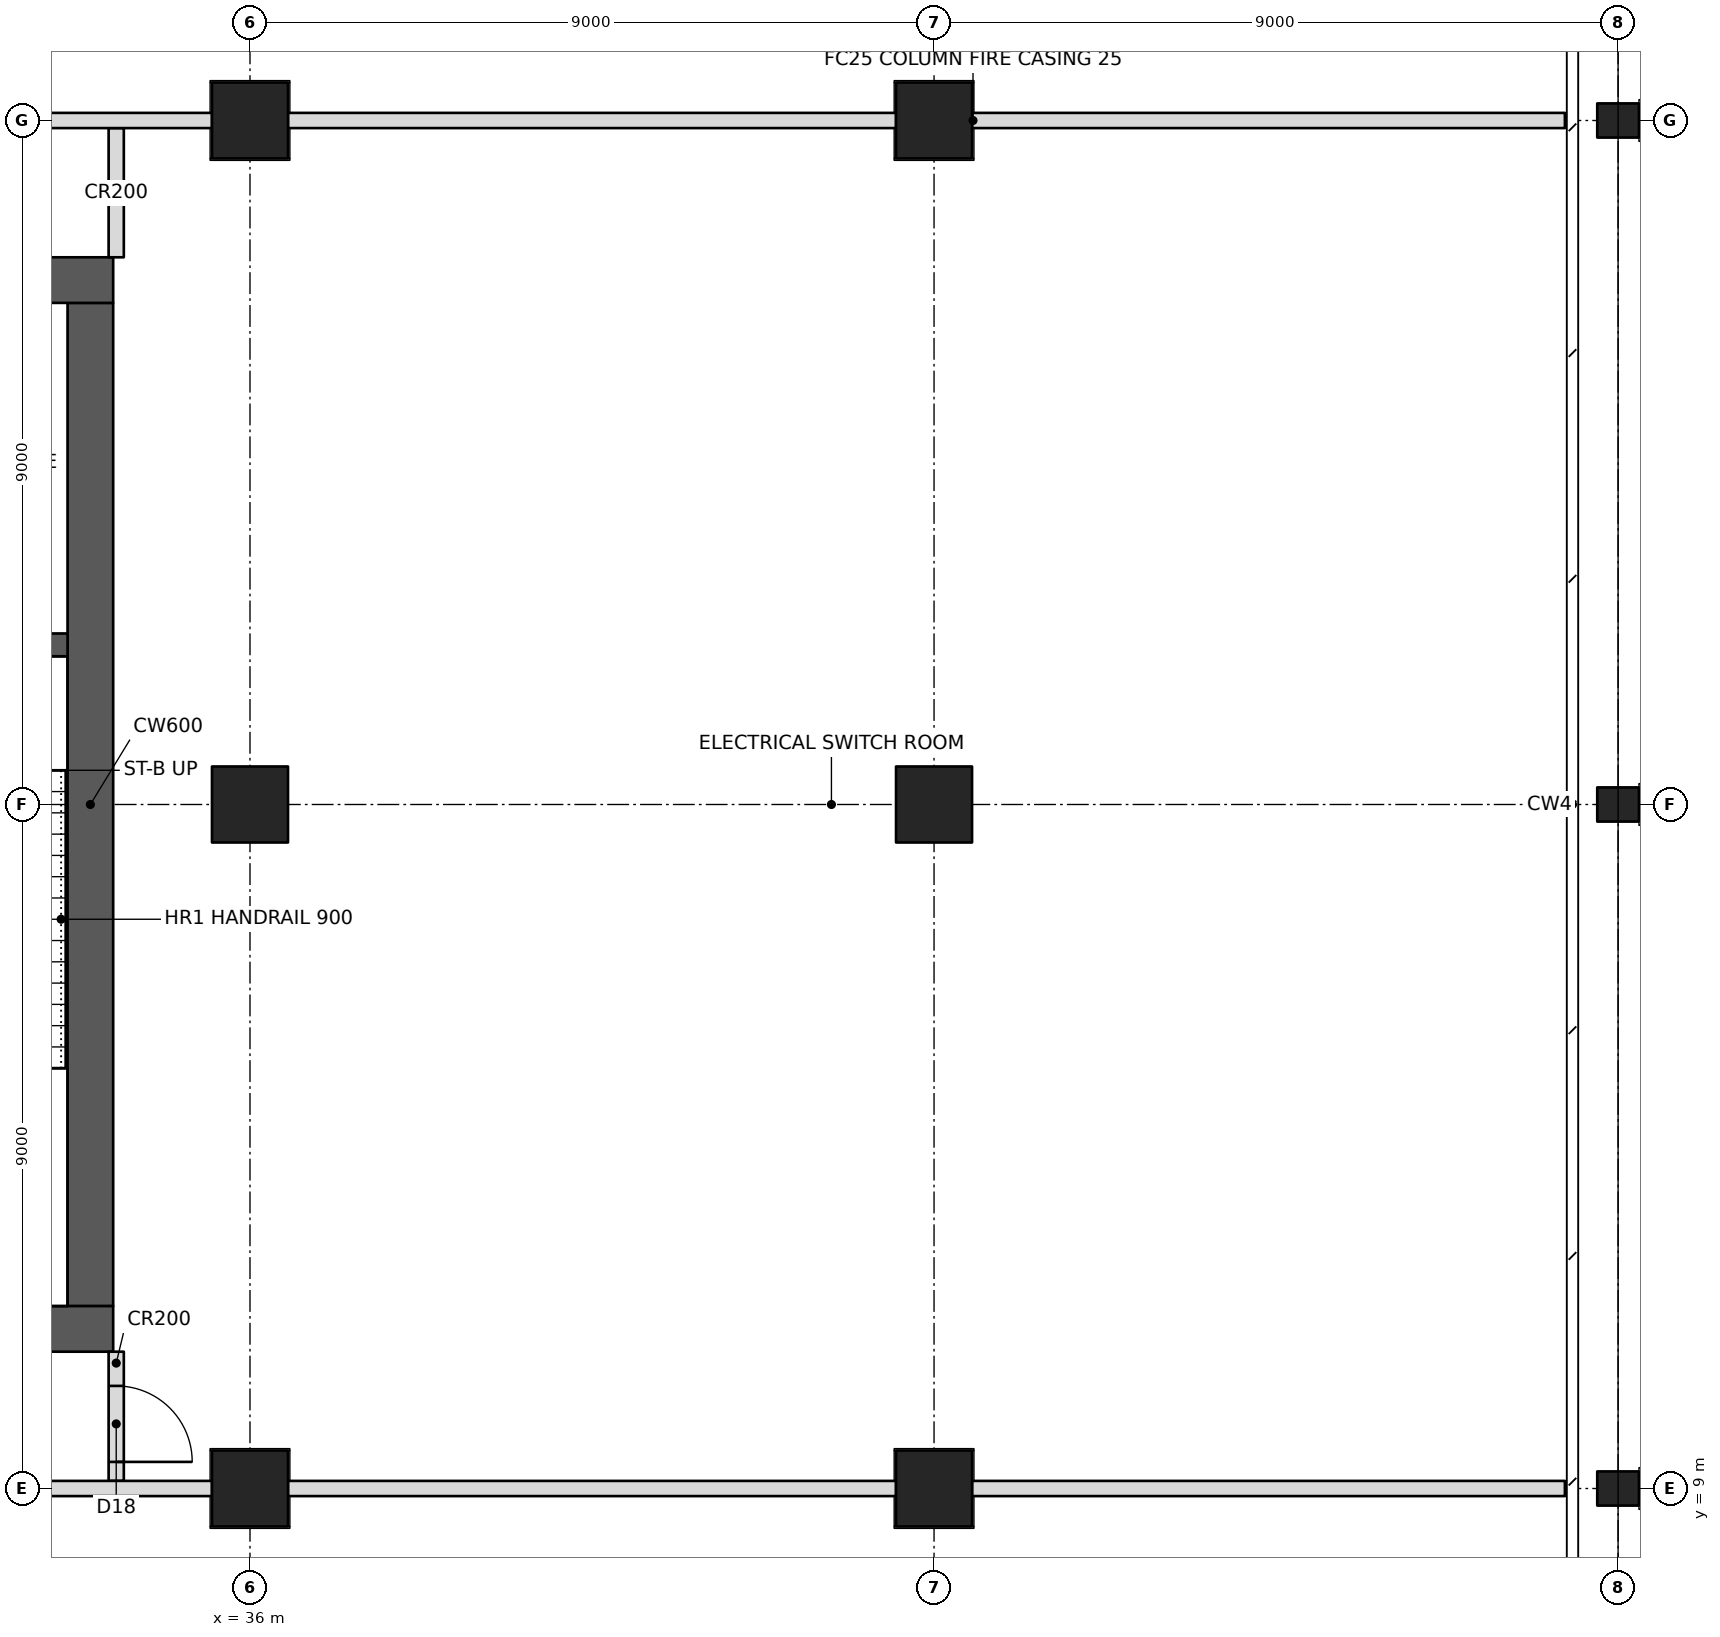
"""IFC4 building model, lengths in metres.
Left out: names, types, materials, properties, quantities, classifications, styles, units other than length and angle.
Written with IfcOpenShell. Run it as: python <this file> out.ifc"""

import sys

from ifc_helpers import new_model, si_unit, direction, frame, frame_2d, origin, origin_2d, place, context, subcontext, project, spatial, rectangle, hollow_rectangle, i_section, extrude, element, fill, save


model = new_model("IFC4")
c1 = context("Model", 3, precision=1e-05, world=origin(), true_north=direction((0.0, 1.0)))
c2 = subcontext(c1, "Body", "Model", "MODEL_VIEW")
j1 = project(units=[si_unit("LENGTHUNIT", "METRE"), si_unit("PLANEANGLEUNIT", "RADIAN")], contexts=[c1])
p1 = place(None, origin())
s1 = spatial("IfcSite", under=j1, at=p1, CompositionType="ELEMENT")
p2 = place(p1, origin())
s2 = spatial("IfcBuilding", under=s1, at=p2, CompositionType="ELEMENT")
p3 = place(p2, frame((0.0, 0.0, 89.2)))
s3 = spatial("IfcBuildingStorey", under=s2, at=p3, CompositionType="ELEMENT", Elevation=89.2)
for number, where, z_axis, x_axis in (
    (1, (36.0, 9.0, 0.0), (0.0, 0.0, 1.0), (0.0, 1.0, 0.0)),
    (2, (36.0, 18.0, 0.0), (0.0, 0.0, 1.0), (0.0, 1.0, 0.0)),
    (3, (36.0, 27.0, 0.0), (0.0, 0.0, 1.0), (1.0, 0.0, 0.0)),
    (4, (45.0, 9.0, 0.0), (0.0, 0.0, 1.0), (0.0, 1.0, 0.0)),
    (5, (45.0, 18.0, 0.0), (0.0, 0.0, 1.0), (0.0, 1.0, 0.0)),
    (6, (45.0, 27.0, 0.0), (0.0, 0.0, 1.0), (0.0, 1.0, 0.0)),
):
    element("IfcColumn", number, at=place(p3, frame(where, z_axis=z_axis, x_axis=x_axis)), inside=s3, PredefinedType="COLUMN", context=c2, shape_type="SweptSolid", body=[
        extrude(hollow_rectangle(XDim=1.0, YDim=1.0, WallThickness=0.1, at=origin_2d()), origin(), (0.0, 0.0, 1.0), 5.0),
    ])
for number, where, z_axis, x_axis in (
    (7, (54.0, 9.0, 0.0), (0.0, 0.0, 1.0), (0.0, 1.0, 0.0)),
    (8, (54.0, 18.0, 0.0), (0.0, 0.0, 1.0), (0.0, 1.0, 0.0)),
    (9, (54.0, 27.0, 0.0), (0.0, 0.0, 1.0), (0.0, 1.0, 0.0)),
):
    element("IfcColumn", number, at=place(p3, frame(where, z_axis=z_axis, x_axis=x_axis)), inside=s3, PredefinedType="COLUMN", context=c2, shape_type="SweptSolid", body=[
        extrude(i_section(OverallWidth=0.449, OverallDepth=0.549, WebThickness=0.072, FlangeThickness=0.115, at=origin_2d()), origin(), (0.0, 0.0, 1.0), 5.0),
    ])
p4 = place(p3, frame((10.8, 11.1, 0.0), z_axis=(0.0, 0.0, 1.0), x_axis=(1.0, 0.0, 0.0)))
e10 = element("IfcWall", 10, at=p4, inside=s3, PredefinedType="SHEAR", context=c2, shape_type="SweptSolid", body=[
    extrude(rectangle(XDim=23.4, YDim=0.6, at=frame_2d((11.7, 0.0))), origin(), (0.0, 0.0, 1.0), 5.0),
])
p5 = place(p4, frame((1.0, 0.0, 0.0)))
e11 = element("IfcOpeningElement", 11, at=p5, cuts=e10, PredefinedType="OPENING", context=c2, shape_type="SweptSolid", body=[
    extrude(rectangle(XDim=1.0, YDim=2.1, at=frame_2d((0.5, 1.05))), frame((0.0, 0.31, 0.0), z_axis=(0.0, -1.0, 0.0), x_axis=(1.0, 0.0, 0.0)), (0.0, 0.0, 1.0), 0.62),
])
p6 = place(p4, frame((17.2, 0.0, 0.0)))
e12 = element("IfcOpeningElement", 12, at=p6, cuts=e10, PredefinedType="OPENING", context=c2, shape_type="SweptSolid", body=[
    extrude(rectangle(XDim=1.8, YDim=2.1, at=frame_2d((0.9, 1.05))), frame((0.0, 0.31, 0.0), z_axis=(0.0, -1.0, 0.0), x_axis=(1.0, 0.0, 0.0)), (0.0, 0.0, 1.0), 0.62),
])
p7 = place(p3, frame((10.8, 24.9, 0.0), z_axis=(0.0, 0.0, 1.0), x_axis=(1.0, 0.0, 0.0)))
e13 = element("IfcWall", 13, at=p7, inside=s3, PredefinedType="SHEAR", context=c2, shape_type="SweptSolid", body=[
    extrude(rectangle(XDim=23.4, YDim=0.6, at=frame_2d((11.7, 0.0))), origin(), (0.0, 0.0, 1.0), 5.0),
])
p8 = place(p7, frame((17.2, 0.0, 0.0)))
e14 = element("IfcOpeningElement", 14, at=p8, cuts=e13, PredefinedType="OPENING", context=c2, shape_type="SweptSolid", body=[
    extrude(rectangle(XDim=1.8, YDim=2.1, at=frame_2d((0.9, 1.05))), frame((0.0, 0.31, 0.0), z_axis=(0.0, -1.0, 0.0), x_axis=(1.0, 0.0, 0.0)), (0.0, 0.0, 1.0), 0.62),
])
p9 = place(p7, frame((21.1, 0.0, 0.0)))
e15 = element("IfcOpeningElement", 15, at=p9, cuts=e13, PredefinedType="OPENING", context=c2, shape_type="SweptSolid", body=[
    extrude(rectangle(XDim=1.0, YDim=2.1, at=frame_2d((0.5, 1.05))), frame((0.0, 0.31, 0.0), z_axis=(0.0, -1.0, 0.0), x_axis=(1.0, 0.0, 0.0)), (0.0, 0.0, 1.0), 0.62),
])
p10 = place(p3, frame((33.9, 11.4, 0.0), z_axis=(0.0, 0.0, 1.0), x_axis=(0.0, 1.0, 0.0)))
e16 = element("IfcWall", 16, at=p10, inside=s3, PredefinedType="SHEAR", context=c2, shape_type="SweptSolid", body=[
    extrude(rectangle(XDim=13.2, YDim=0.6, at=frame_2d((6.6, 0.0))), origin(), (0.0, 0.0, 1.0), 5.0),
])
p11 = place(p3, frame((30.75, 20.1, 0.0), z_axis=(0.0, 0.0, 1.0), x_axis=(1.0, 0.0, 0.0)))
e17 = element("IfcWall", 17, at=p11, inside=s3, PredefinedType="SHEAR", context=c2, shape_type="SweptSolid", body=[
    extrude(rectangle(XDim=2.85, YDim=0.3, at=frame_2d((1.425, 0.0))), origin(), (0.0, 0.0, 1.0), 5.0),
])
p12 = place(p11, frame((1.15, 0.0, 0.0)))
e18 = element("IfcOpeningElement", 18, at=p12, cuts=e17, PredefinedType="OPENING", context=c2, shape_type="SweptSolid", body=[
    extrude(rectangle(XDim=1.0, YDim=2.1, at=frame_2d((0.5, 1.05))), frame((0.0, 0.16, 0.0), z_axis=(0.0, -1.0, 0.0), x_axis=(1.0, 0.0, 0.0)), (0.0, 0.0, 1.0), 0.32),
])
p13 = place(p3, frame((27.5, 9.0, 0.0), z_axis=(0.0, 0.0, 1.0), x_axis=(1.0, 0.0, 0.0)))
e19 = element("IfcWall", 19, at=p13, inside=s3, PredefinedType="PARTITIONING", context=c2, shape_type="SweptSolid", body=[
    extrude(rectangle(XDim=8.0, YDim=0.2, at=frame_2d((4.0, 0.0))), origin(), (0.0, 0.0, 1.0), 4.005),
])
p14 = place(p3, frame((36.5, 9.0, 0.0), z_axis=(0.0, 0.0, 1.0), x_axis=(1.0, 0.0, 0.0)))
e20 = element("IfcWall", 20, at=p14, inside=s3, PredefinedType="PARTITIONING", context=c2, shape_type="SweptSolid", body=[
    extrude(rectangle(XDim=8.0, YDim=0.2, at=frame_2d((4.0, 0.0))), origin(), (0.0, 0.0, 1.0), 4.038),
])
p15 = place(p3, frame((45.5, 9.0, 0.0), z_axis=(0.0, 0.0, 1.0), x_axis=(1.0, 0.0, 0.0)))
e21 = element("IfcWall", 21, at=p15, inside=s3, PredefinedType="PARTITIONING", context=c2, shape_type="SweptSolid", body=[
    extrude(rectangle(XDim=7.8, YDim=0.2, at=frame_2d((3.9, 0.0))), origin(), (0.0, 0.0, 1.0), 4.038),
])
p16 = place(p3, frame((34.24, 9.1, 0.0), z_axis=(0.0, 0.0, 1.0), x_axis=(0.0, 1.0, 0.0)))
e22 = element("IfcWall", 22, at=p16, inside=s3, PredefinedType="PARTITIONING", context=c2, shape_type="SweptSolid", body=[
    extrude(rectangle(XDim=1.7, YDim=0.2, at=frame_2d((0.85, 0.0))), origin(), (0.0, 0.0, 1.0), 4.004),
])
p17 = place(p16, frame((0.25, 0.0, 0.0)))
e23 = element("IfcOpeningElement", 23, at=p17, cuts=e22, PredefinedType="OPENING", context=c2, shape_type="SweptSolid", body=[
    extrude(rectangle(XDim=1.0, YDim=2.1, at=frame_2d((0.5, 1.05))), frame((0.0, 0.11, 0.0), z_axis=(0.0, -1.0, 0.0), x_axis=(1.0, 0.0, 0.0)), (0.0, 0.0, 1.0), 0.22),
])
p18 = place(p3, frame((27.5, 27.0, 0.0), z_axis=(0.0, 0.0, 1.0), x_axis=(1.0, 0.0, 0.0)))
e24 = element("IfcWall", 24, at=p18, inside=s3, PredefinedType="PARTITIONING", context=c2, shape_type="SweptSolid", body=[
    extrude(rectangle(XDim=8.0, YDim=0.2, at=frame_2d((4.0, 0.0))), origin(), (0.0, 0.0, 1.0), 4.005),
])
p19 = place(p3, frame((36.5, 27.0, 0.0), z_axis=(0.0, 0.0, 1.0), x_axis=(1.0, 0.0, 0.0)))
e25 = element("IfcWall", 25, at=p19, inside=s3, PredefinedType="PARTITIONING", context=c2, shape_type="SweptSolid", body=[
    extrude(rectangle(XDim=8.0, YDim=0.2, at=frame_2d((4.0, 0.0))), origin(), (0.0, 0.0, 1.0), 4.038),
])
p20 = place(p3, frame((45.5, 27.0, 0.0), z_axis=(0.0, 0.0, 1.0), x_axis=(1.0, 0.0, 0.0)))
e26 = element("IfcWall", 26, at=p20, inside=s3, PredefinedType="PARTITIONING", context=c2, shape_type="SweptSolid", body=[
    extrude(rectangle(XDim=7.8, YDim=0.2, at=frame_2d((3.9, 0.0))), origin(), (0.0, 0.0, 1.0), 4.038),
])
p21 = place(p3, frame((34.24, 25.2, 0.0), z_axis=(0.0, 0.0, 1.0), x_axis=(0.0, 1.0, 0.0)))
e27 = element("IfcWall", 27, at=p21, inside=s3, PredefinedType="PARTITIONING", context=c2, shape_type="SweptSolid", body=[
    extrude(rectangle(XDim=1.7, YDim=0.2, at=frame_2d((0.85, 0.0))), origin(), (0.0, 0.0, 1.0), 4.004),
])
p22 = place(p17, frame((1.0, 0.0, 0.0), z_axis=(0.0, 0.0, 1.0), x_axis=(-1.0, 0.0, 0.0)))
e28 = element("IfcDoor", 28, at=p22, inside=s3, OperationType="SINGLE_SWING_RIGHT", PredefinedType="DOOR", context=c2, shape_type="SweptSolid", body=[
    extrude(rectangle(XDim=1.0, YDim=2.1, at=frame_2d((0.5, 1.05))), frame((0.0, 0.025, 0.0), z_axis=(0.0, -1.0, 0.0), x_axis=(1.0, 0.0, 0.0)), (0.0, 0.0, 1.0), 0.05),
])
fill(e23, e28)
save(model, sys.argv[1])
